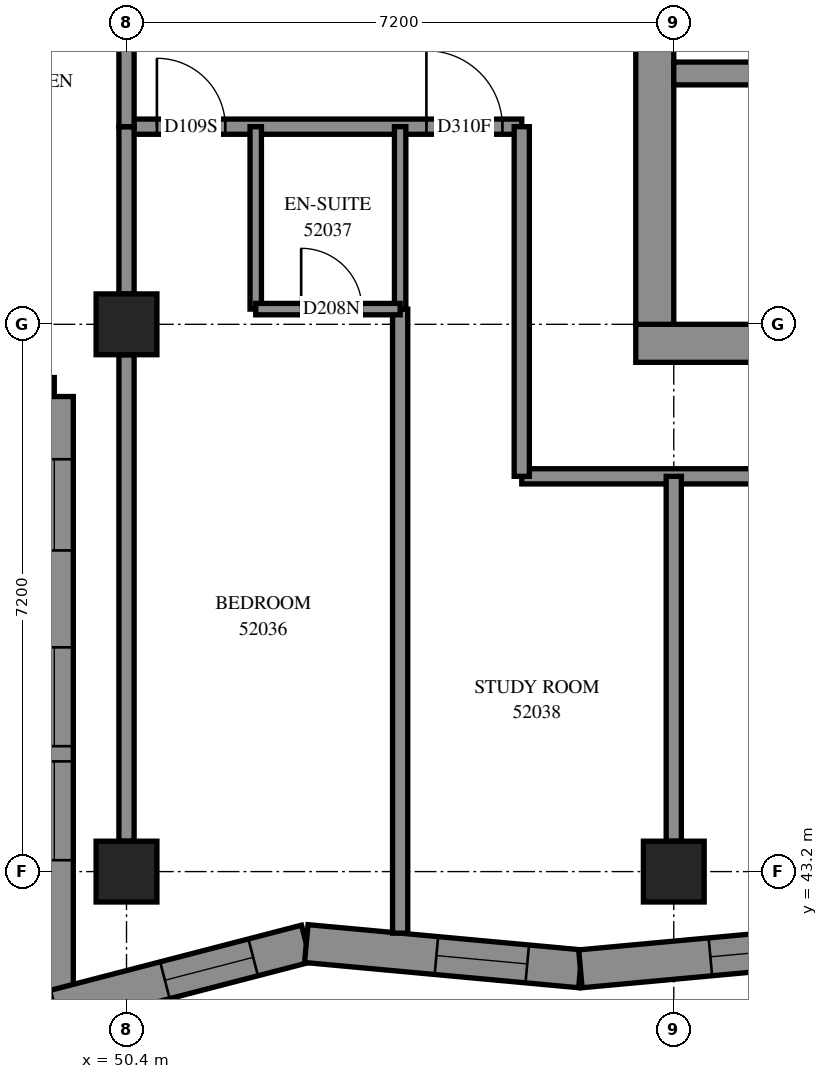
"""IFC4 building model, lengths in metres.
Left out: names, types, materials, properties, quantities, classifications, styles, units other than length and angle.
Written with IfcOpenShell. Run it as: python <this file> out.ifc"""

import sys

from ifc_helpers import new_model, si_unit, direction, frame, frame_2d, origin, origin_2d, place, context, subcontext, project, spatial, polyline, rectangle, outline, extrude, element, fill, save


model = new_model("IFC4")
c1 = context("Model", 3, precision=1e-05, world=origin(), true_north=direction((0.0, 1.0)))
c2 = subcontext(c1, "Body", "Model", "MODEL_VIEW")
j1 = project(units=[si_unit("LENGTHUNIT", "METRE"), si_unit("PLANEANGLEUNIT", "RADIAN")], contexts=[c1])
p1 = place(None, origin())
s1 = spatial("IfcSite", under=j1, at=p1, CompositionType="ELEMENT")
p2 = place(p1, origin())
s2 = spatial("IfcBuilding", under=s1, at=p2, CompositionType="ELEMENT")
p3 = place(p2, frame((0.0, 0.0, 193.0)))
s3 = spatial("IfcBuildingStorey", under=s2, at=p3, CompositionType="ELEMENT", Elevation=193.0)
for number, where, z_axis, x_axis in (
    (1, (50.4, 43.2, 0.0), (0.0, 0.0, 1.0), (1.0, 0.0, 0.0)),
    (2, (50.4, 50.4, 0.0), (0.0, 0.0, 1.0), (1.0, 0.0, 0.0)),
    (3, (57.6, 43.2, 0.0), (0.0, 0.0, 1.0), (1.0, 0.0, 0.0)),
):
    element("IfcColumn", number, at=place(p3, frame(where, z_axis=z_axis, x_axis=x_axis)), inside=s3, PredefinedType="COLUMN", context=c2, shape_type="SweptSolid", body=[
        extrude(rectangle(XDim=0.8, YDim=0.8, at=origin_2d()), origin(), (0.0, 0.0, 1.0), 3.1),
    ])
p4 = place(p3, frame((57.1, 50.15, -0.3), z_axis=(0.0, 0.0, 1.0), x_axis=(1.0, 0.0, 0.0)))
e4 = element("IfcWall", 4, at=p4, inside=s3, PredefinedType="SHEAR", context=c2, shape_type="SweptSolid", body=[
    extrude(rectangle(XDim=15.4, YDim=0.5, at=frame_2d((7.7, 0.0))), origin(), (0.0, 0.0, 1.0), 2.7),
])
p5 = place(p3, frame((57.35, 50.4, -0.3), z_axis=(0.0, 0.0, 1.0), x_axis=(0.0, 1.0, 0.0)))
e5 = element("IfcWall", 5, at=p5, inside=s3, PredefinedType="SHEAR", context=c2, shape_type="SweptSolid", body=[
    extrude(rectangle(XDim=14.4, YDim=0.5, at=frame_2d((7.2, 0.0))), origin(), (0.0, 0.0, 1.0), 2.7),
])
p6 = place(p5, frame((4.55, 0.0, 0.3)))
e6 = element("IfcOpeningElement", 6, at=p6, cuts=e5, PredefinedType="OPENING", context=c2, shape_type="SweptSolid", body=[
    extrude(rectangle(XDim=1.1, YDim=2.1, at=frame_2d((0.55, 1.05))), frame((0.0, 0.26, 0.0), z_axis=(0.0, -1.0, 0.0), x_axis=(1.0, 0.0, 0.0)), (0.0, 0.0, 1.0), 0.52),
])
p7 = place(p5, frame((11.35, 0.0, 0.3)))
e7 = element("IfcOpeningElement", 7, at=p7, cuts=e5, PredefinedType="OPENING", context=c2, shape_type="SweptSolid", body=[
    extrude(rectangle(XDim=1.1, YDim=2.1, at=frame_2d((0.55, 1.05))), frame((0.0, 0.26, 0.0), z_axis=(0.0, -1.0, 0.0), x_axis=(1.0, 0.0, 0.0)), (0.0, 0.0, 1.0), 0.52),
])
p8 = place(p3, frame((57.6, 53.7, 0.0), z_axis=(0.0, 0.0, 1.0), x_axis=(1.0, 0.0, 0.0)))
e8 = element("IfcWall", 8, at=p8, inside=s3, PredefinedType="SOLIDWALL", context=c2, shape_type="SweptSolid", body=[
    extrude(rectangle(XDim=14.4, YDim=0.3, at=frame_2d((7.2, 0.0))), origin(), (0.0, 0.0, 1.0), 3.1),
])
p9 = place(p8, frame((1.35, 0.0, 0.0)))
e9 = element("IfcOpeningElement", 9, at=p9, cuts=e8, PredefinedType="OPENING", context=c2, shape_type="SweptSolid", body=[
    extrude(rectangle(XDim=0.9, YDim=2.1, at=frame_2d((0.45, 1.05))), frame((0.0, 0.16, 0.0), z_axis=(0.0, -1.0, 0.0), x_axis=(1.0, 0.0, 0.0)), (0.0, 0.0, 1.0), 0.32),
])
p10 = place(p8, frame((4.95, 0.0, 0.0)))
e10 = element("IfcOpeningElement", 10, at=p10, cuts=e8, PredefinedType="OPENING", context=c2, shape_type="SweptSolid", body=[
    extrude(rectangle(XDim=0.9, YDim=2.1, at=frame_2d((0.45, 1.05))), frame((0.0, 0.16, 0.0), z_axis=(0.0, -1.0, 0.0), x_axis=(1.0, 0.0, 0.0)), (0.0, 0.0, 1.0), 0.32),
])
p11 = place(p8, frame((8.55, 0.0, 0.0)))
e11 = element("IfcOpeningElement", 11, at=p11, cuts=e8, PredefinedType="OPENING", context=c2, shape_type="SweptSolid", body=[
    extrude(rectangle(XDim=0.9, YDim=2.1, at=frame_2d((0.45, 1.05))), frame((0.0, 0.16, 0.0), z_axis=(0.0, -1.0, 0.0), x_axis=(1.0, 0.0, 0.0)), (0.0, 0.0, 1.0), 0.32),
])
p12 = place(p8, frame((12.05, 0.0, 0.0)))
e12 = element("IfcOpeningElement", 12, at=p12, cuts=e8, PredefinedType="OPENING", context=c2, shape_type="SweptSolid", body=[
    extrude(rectangle(XDim=1.1, YDim=2.1, at=frame_2d((0.55, 1.05))), frame((0.0, 0.16, 0.0), z_axis=(0.0, -1.0, 0.0), x_axis=(1.0, 0.0, 0.0)), (0.0, 0.0, 1.0), 0.32),
])
p13 = place(p3, frame((42.25, 49.45, 0.0), z_axis=(0.0, 0.0, 1.0), x_axis=(1.0, 0.0, 0.0)))
e13 = element("IfcWall", 13, at=p13, inside=s3, PredefinedType="SOLIDWALL", context=c2, shape_type="SweptSolid", body=[
    extrude(outline(polyline([(-0.25, -0.25), (6.95, -0.25), (7.45, 0.25), (0.25, 0.25), (-0.25, -0.25)])), origin(), (0.0, 0.0, 1.0), 3.1),
])
p14 = place(p13, frame((1.35, 0.0, 0.45)))
e14 = element("IfcOpeningElement", 14, at=p14, cuts=e13, PredefinedType="OPENING", context=c2, shape_type="SweptSolid", body=[
    extrude(rectangle(XDim=1.3, YDim=2.5, at=frame_2d((0.65, 1.25))), frame((0.0, 0.26, 0.0), z_axis=(0.0, -1.0, 0.0), x_axis=(1.0, 0.0, 0.0)), (0.0, 0.0, 1.0), 0.52),
])
p15 = place(p13, frame((2.85, 0.0, 0.45)))
e15 = element("IfcOpeningElement", 15, at=p15, cuts=e13, PredefinedType="OPENING", context=c2, shape_type="SweptSolid", body=[
    extrude(rectangle(XDim=1.3, YDim=2.5, at=frame_2d((0.65, 1.25))), frame((0.0, 0.26, 0.0), z_axis=(0.0, -1.0, 0.0), x_axis=(1.0, 0.0, 0.0)), (0.0, 0.0, 1.0), 0.52),
])
p16 = place(p13, frame((5.175, 0.0, 0.45)))
e16 = element("IfcOpeningElement", 16, at=p16, cuts=e13, PredefinedType="OPENING", context=c2, shape_type="SweptSolid", body=[
    extrude(rectangle(XDim=1.2, YDim=2.5, at=frame_2d((0.6, 1.25))), frame((0.0, 0.26, 0.0), z_axis=(0.0, -1.0, 0.0), x_axis=(1.0, 0.0, 0.0)), (0.0, 0.0, 1.0), 0.52),
])
p17 = place(p3, frame((49.45, 49.45, 0.0), z_axis=(0.0, 0.0, 1.0), x_axis=(0.0, -1.0, 0.0)))
e17 = element("IfcWall", 17, at=p17, inside=s3, PredefinedType="SOLIDWALL", context=c2, shape_type="SweptSolid", body=[
    extrude(outline(polyline([(0.25, -0.25), (8.38, -0.25), (7.734, 0.25), (-0.25, 0.25), (0.25, -0.25)])), origin(), (0.0, 0.0, 1.0), 3.1),
])
p18 = place(p17, frame((3.3, 0.0, 0.45)))
e18 = element("IfcOpeningElement", 18, at=p18, cuts=e17, PredefinedType="OPENING", context=c2, shape_type="SweptSolid", body=[
    extrude(rectangle(XDim=1.3, YDim=2.5, at=frame_2d((0.65, 1.25))), frame((0.0, 0.26, 0.0), z_axis=(0.0, -1.0, 0.0), x_axis=(1.0, 0.0, 0.0)), (0.0, 0.0, 1.0), 0.52),
])
p19 = place(p17, frame((4.8, 0.0, 0.45)))
e19 = element("IfcOpeningElement", 19, at=p19, cuts=e17, PredefinedType="OPENING", context=c2, shape_type="SweptSolid", body=[
    extrude(rectangle(XDim=1.3, YDim=2.5, at=frame_2d((0.65, 1.25))), frame((0.0, 0.26, 0.0), z_axis=(0.0, -1.0, 0.0), x_axis=(1.0, 0.0, 0.0)), (0.0, 0.0, 1.0), 0.52),
])
p20 = place(p17, frame((0.825, 0.0, 0.45)))
e20 = element("IfcOpeningElement", 20, at=p20, cuts=e17, PredefinedType="OPENING", context=c2, shape_type="SweptSolid", body=[
    extrude(rectangle(XDim=1.2, YDim=2.5, at=frame_2d((0.6, 1.25))), frame((0.0, 0.26, 0.0), z_axis=(0.0, -1.0, 0.0), x_axis=(1.0, 0.0, 0.0)), (0.0, 0.0, 1.0), 0.52),
])
p21 = place(p3, frame((49.45, 41.393, 0.0), z_axis=(0.0, 0.0, 1.0), x_axis=(0.9679753526, 0.2510452486, 0.0)))
e21 = element("IfcWall", 21, at=p21, inside=s3, PredefinedType="SOLIDWALL", context=c2, shape_type="SweptSolid", body=[
    extrude(outline(polyline([(-0.323, -0.25), (3.381, -0.25), (3.469, 0.25), (0.323, 0.25), (-0.323, -0.25)])), origin(), (0.0, 0.0, 1.0), 3.1),
])
p22 = place(p21, frame((1.503, 0.0, 0.45)))
e22 = element("IfcOpeningElement", 22, at=p22, cuts=e21, PredefinedType="OPENING", context=c2, shape_type="SweptSolid", body=[
    extrude(rectangle(XDim=1.2, YDim=2.5, at=frame_2d((0.6, 1.25))), frame((0.0, 0.26, 0.0), z_axis=(0.0, -1.0, 0.0), x_axis=(1.0, 0.0, 0.0)), (0.0, 0.0, 1.0), 0.52),
])
p23 = place(p3, frame((52.765, 42.253, 0.0), z_axis=(0.0, 0.0, 1.0), x_axis=(0.9957941627, -0.0916186959, 0.0)))
e23 = element("IfcWall", 23, at=p23, inside=s3, PredefinedType="SOLIDWALL", context=c2, shape_type="SweptSolid", body=[
    extrude(outline(polyline([(0.044, -0.25), (3.644, -0.25), (3.599, 0.25), (-0.044, 0.25), (0.044, -0.25)])), origin(), (0.0, 0.0, 1.0), 3.1),
])
p24 = place(p23, frame((1.719, 0.0, 0.45)))
e24 = element("IfcOpeningElement", 24, at=p24, cuts=e23, PredefinedType="OPENING", context=c2, shape_type="SweptSolid", body=[
    extrude(rectangle(XDim=1.2, YDim=2.5, at=frame_2d((0.6, 1.25))), frame((0.0, 0.26, 0.0), z_axis=(0.0, -1.0, 0.0), x_axis=(1.0, 0.0, 0.0)), (0.0, 0.0, 1.0), 0.52),
])
p25 = place(p3, frame((56.371, 41.921, 0.0), z_axis=(0.0, 0.0, 1.0), x_axis=(0.9957917474, 0.0916449443, 0.0)))
e25 = element("IfcWall", 25, at=p25, inside=s3, PredefinedType="SOLIDWALL", context=c2, shape_type="SweptSolid", body=[
    extrude(outline(polyline([(-0.023, -0.25), (3.578, -0.25), (3.624, 0.25), (0.023, 0.25), (-0.023, -0.25)])), origin(), (0.0, 0.0, 1.0), 3.1),
])
p26 = place(p25, frame((1.717, 0.0, 0.45)))
e26 = element("IfcOpeningElement", 26, at=p26, cuts=e25, PredefinedType="OPENING", context=c2, shape_type="SweptSolid", body=[
    extrude(rectangle(XDim=1.2, YDim=2.5, at=frame_2d((0.6, 1.25))), frame((0.0, 0.26, 0.0), z_axis=(0.0, -1.0, 0.0), x_axis=(1.0, 0.0, 0.0)), (0.0, 0.0, 1.0), 0.52),
])
p27 = place(p3, frame((55.6, 48.4, 0.0), z_axis=(0.0, 0.0, 1.0), x_axis=(1.0, 0.0, 0.0)))
e27 = element("IfcWall", 27, at=p27, inside=s3, PredefinedType="PARTITIONING", context=c2, shape_type="SweptSolid", body=[
    extrude(rectangle(XDim=18.4, YDim=0.2, at=frame_2d((9.2, 0.0))), origin(), (0.0, 0.0, 1.0), 3.1),
])
p28 = place(p27, frame((5.862, 0.0, 0.0)))
e28 = element("IfcOpeningElement", 28, at=p28, cuts=e27, PredefinedType="OPENING", context=c2, shape_type="SweptSolid", body=[
    extrude(rectangle(XDim=1.0, YDim=2.1, at=frame_2d((0.5, 1.05))), frame((0.0, 0.11, 0.0), z_axis=(0.0, -1.0, 0.0), x_axis=(1.0, 0.0, 0.0)), (0.0, 0.0, 1.0), 0.22),
])
p29 = place(p27, frame((11.5, 0.0, 0.0)))
e29 = element("IfcOpeningElement", 29, at=p29, cuts=e27, PredefinedType="OPENING", context=c2, shape_type="SweptSolid", body=[
    extrude(rectangle(XDim=0.9, YDim=2.1, at=frame_2d((0.45, 1.05))), frame((0.0, 0.11, 0.0), z_axis=(0.0, -1.0, 0.0), x_axis=(1.0, 0.0, 0.0)), (0.0, 0.0, 1.0), 0.22),
])
p30 = place(p27, frame((13.2, 0.0, 0.0)))
e30 = element("IfcOpeningElement", 30, at=p30, cuts=e27, PredefinedType="OPENING", context=c2, shape_type="SweptSolid", body=[
    extrude(rectangle(XDim=0.9, YDim=2.1, at=frame_2d((0.45, 1.05))), frame((0.0, 0.11, 0.0), z_axis=(0.0, -1.0, 0.0), x_axis=(1.0, 0.0, 0.0)), (0.0, 0.0, 1.0), 0.22),
])
p31 = place(p3, frame((54.0, 42.39, 0.0), z_axis=(0.0, 0.0, 1.0), x_axis=(0.0, 1.0, 0.0)))
e31 = element("IfcWall", 31, at=p31, inside=s3, PredefinedType="PARTITIONING", context=c2, shape_type="SweptSolid", body=[
    extrude(rectangle(XDim=8.21, YDim=0.2, at=frame_2d((4.105, 0.0))), origin(), (0.0, 0.0, 1.0), 3.1),
])
p32 = place(p3, frame((50.4, 43.6, 0.0), z_axis=(0.0, 0.0, 1.0), x_axis=(0.0, 1.0, 0.0)))
e32 = element("IfcWall", 32, at=p32, inside=s3, PredefinedType="PARTITIONING", context=c2, shape_type="SweptSolid", body=[
    extrude(rectangle(XDim=6.4, YDim=0.2, at=frame_2d((3.2, 0.0))), origin(), (0.0, 0.0, 1.0), 2.6),
])
p33 = place(p3, frame((50.4, 53.0, 0.0), z_axis=(0.0, 0.0, 1.0), x_axis=(1.0, 0.0, 0.0)))
e33 = element("IfcWall", 33, at=p33, inside=s3, PredefinedType="PARTITIONING", context=c2, shape_type="SweptSolid", body=[
    extrude(rectangle(XDim=5.2, YDim=0.2, at=frame_2d((2.6, 0.0))), origin(), (0.0, 0.0, 1.0), 3.1),
])
p34 = place(p33, frame((0.4, 0.0, 0.0)))
e34 = element("IfcOpeningElement", 34, at=p34, cuts=e33, PredefinedType="OPENING", context=c2, shape_type="SweptSolid", body=[
    extrude(rectangle(XDim=0.9, YDim=2.1, at=frame_2d((0.45, 1.05))), frame((0.0, 0.11, 0.0), z_axis=(0.0, -1.0, 0.0), x_axis=(1.0, 0.0, 0.0)), (0.0, 0.0, 1.0), 0.22),
])
p35 = place(p33, frame((3.946, 0.0, 0.0)))
e35 = element("IfcOpeningElement", 35, at=p35, cuts=e33, PredefinedType="OPENING", context=c2, shape_type="SweptSolid", body=[
    extrude(rectangle(XDim=1.0, YDim=2.1, at=frame_2d((0.5, 1.05))), frame((0.0, 0.11, 0.0), z_axis=(0.0, -1.0, 0.0), x_axis=(1.0, 0.0, 0.0)), (0.0, 0.0, 1.0), 0.22),
])
p36 = place(p3, frame((57.6, 43.6, 0.0), z_axis=(0.0, 0.0, 1.0), x_axis=(0.0, 1.0, 0.0)))
e36 = element("IfcWall", 36, at=p36, inside=s3, PredefinedType="PARTITIONING", context=c2, shape_type="SweptSolid", body=[
    extrude(rectangle(XDim=4.8, YDim=0.2, at=frame_2d((2.4, 0.0))), origin(), (0.0, 0.0, 1.0), 3.1),
])
p37 = place(p3, frame((55.6, 48.4, 0.0), z_axis=(0.0, 0.0, 1.0), x_axis=(0.0, 1.0, 0.0)))
e37 = element("IfcWall", 37, at=p37, inside=s3, PredefinedType="PARTITIONING", context=c2, shape_type="SweptSolid", body=[
    extrude(rectangle(XDim=4.6, YDim=0.2, at=frame_2d((2.3, 0.0))), origin(), (0.0, 0.0, 1.0), 3.1),
])
for number, where, z_axis, x_axis in (
    (38, (52.1, 50.6, 0.0), (0.0, 0.0, 1.0), (0.0, 1.0, 0.0)),
    (39, (54.0, 50.6, 0.0), (0.0, 0.0, 1.0), (0.0, 1.0, 0.0)),
):
    element("IfcWall", number, at=place(p3, frame(where, z_axis=z_axis, x_axis=x_axis)), inside=s3, PredefinedType="PARTITIONING", context=c2, shape_type="SweptSolid", body=[
        extrude(rectangle(XDim=2.4, YDim=0.15, at=frame_2d((1.2, 0.0))), origin(), (0.0, 0.0, 1.0), 3.1),
    ])
p38 = place(p3, frame((50.4, 50.8, 0.0), z_axis=(0.0, 0.0, 1.0), x_axis=(0.0, 1.0, 0.0)))
e40 = element("IfcWall", 40, at=p38, inside=s3, PredefinedType="PARTITIONING", context=c2, shape_type="SweptSolid", body=[
    extrude(rectangle(XDim=2.2, YDim=0.2, at=frame_2d((1.1, 0.0))), origin(), (0.0, 0.0, 1.0), 3.1),
])
p39 = place(p3, frame((50.4, 53.0, 0.0), z_axis=(0.0, 0.0, 1.0), x_axis=(0.0, 1.0, 0.0)))
e41 = element("IfcWall", 41, at=p39, inside=s3, PredefinedType="PARTITIONING", context=c2, shape_type="SweptSolid", body=[
    extrude(rectangle(XDim=2.0, YDim=0.2, at=frame_2d((1.0, 0.0))), origin(), (0.0, 0.0, 1.0), 3.1),
])
p40 = place(p3, frame((52.1, 50.6, 0.0), z_axis=(0.0, 0.0, 1.0), x_axis=(1.0, 0.0, 0.0)))
e42 = element("IfcWall", 42, at=p40, inside=s3, PredefinedType="PARTITIONING", context=c2, shape_type="SweptSolid", body=[
    extrude(rectangle(XDim=1.9, YDim=0.15, at=frame_2d((0.95, 0.0))), origin(), (0.0, 0.0, 1.0), 3.1),
])
p41 = place(p40, frame((0.598, 0.0, 0.0)))
e43 = element("IfcOpeningElement", 43, at=p41, cuts=e42, PredefinedType="OPENING", context=c2, shape_type="SweptSolid", body=[
    extrude(rectangle(XDim=0.8, YDim=2.1, at=frame_2d((0.4, 1.05))), frame((0.0, 0.085, 0.0), z_axis=(0.0, -1.0, 0.0), x_axis=(1.0, 0.0, 0.0)), (0.0, 0.0, 1.0), 0.17),
])
p42 = place(p18, origin())
e44 = element("IfcWindow", 44, at=p42, inside=s3, PartitioningType="SINGLE_PANEL", PredefinedType="WINDOW", context=c2, shape_type="SweptSolid", body=[
    extrude(rectangle(XDim=1.3, YDim=2.5, at=frame_2d((0.65, 1.25))), frame((0.0, 0.18, 0.0), z_axis=(0.0, -1.0, 0.0), x_axis=(1.0, 0.0, 0.0)), (0.0, 0.0, 1.0), 0.06),
])
fill(e18, e44)
p43 = place(p19, origin())
e45 = element("IfcWindow", 45, at=p43, inside=s3, PartitioningType="SINGLE_PANEL", PredefinedType="WINDOW", context=c2, shape_type="SweptSolid", body=[
    extrude(rectangle(XDim=1.3, YDim=2.5, at=frame_2d((0.65, 1.25))), frame((0.0, 0.18, 0.0), z_axis=(0.0, -1.0, 0.0), x_axis=(1.0, 0.0, 0.0)), (0.0, 0.0, 1.0), 0.06),
])
fill(e19, e45)
p44 = place(p20, origin())
e46 = element("IfcWindow", 46, at=p44, inside=s3, PartitioningType="SINGLE_PANEL", PredefinedType="WINDOW", context=c2, shape_type="SweptSolid", body=[
    extrude(rectangle(XDim=1.2, YDim=2.5, at=frame_2d((0.6, 1.25))), frame((0.0, 0.18, 0.0), z_axis=(0.0, -1.0, 0.0), x_axis=(1.0, 0.0, 0.0)), (0.0, 0.0, 1.0), 0.06),
])
fill(e20, e46)
p45 = place(p22, origin())
e47 = element("IfcWindow", 47, at=p45, inside=s3, PartitioningType="SINGLE_PANEL", PredefinedType="WINDOW", context=c2, shape_type="SweptSolid", body=[
    extrude(rectangle(XDim=1.2, YDim=2.5, at=frame_2d((0.6, 1.25))), frame((0.0, 0.18, 0.0), z_axis=(0.0, -1.0, 0.0), x_axis=(1.0, 0.0, 0.0)), (0.0, 0.0, 1.0), 0.06),
])
fill(e22, e47)
p46 = place(p24, origin())
e48 = element("IfcWindow", 48, at=p46, inside=s3, PartitioningType="SINGLE_PANEL", PredefinedType="WINDOW", context=c2, shape_type="SweptSolid", body=[
    extrude(rectangle(XDim=1.2, YDim=2.5, at=frame_2d((0.6, 1.25))), frame((0.0, 0.18, 0.0), z_axis=(0.0, -1.0, 0.0), x_axis=(1.0, 0.0, 0.0)), (0.0, 0.0, 1.0), 0.06),
])
fill(e24, e48)
p47 = place(p26, origin())
e49 = element("IfcWindow", 49, at=p47, inside=s3, PartitioningType="SINGLE_PANEL", PredefinedType="WINDOW", context=c2, shape_type="SweptSolid", body=[
    extrude(rectangle(XDim=1.2, YDim=2.5, at=frame_2d((0.6, 1.25))), frame((0.0, 0.18, 0.0), z_axis=(0.0, -1.0, 0.0), x_axis=(1.0, 0.0, 0.0)), (0.0, 0.0, 1.0), 0.06),
])
fill(e26, e49)
p48 = place(p34, origin())
e50 = element("IfcDoor", 50, at=p48, inside=s3, OperationType="SINGLE_SWING_LEFT", PredefinedType="DOOR", context=c2, shape_type="SweptSolid", body=[
    extrude(rectangle(XDim=0.9, YDim=2.1, at=frame_2d((0.45, 1.05))), frame((0.0, 0.025, 0.0), z_axis=(0.0, -1.0, 0.0), x_axis=(1.0, 0.0, 0.0)), (0.0, 0.0, 1.0), 0.05),
])
fill(e34, e50)
p49 = place(p41, origin())
e51 = element("IfcDoor", 51, at=p49, inside=s3, OperationType="SINGLE_SWING_RIGHT", PredefinedType="DOOR", context=c2, shape_type="SweptSolid", body=[
    extrude(rectangle(XDim=0.8, YDim=2.1, at=frame_2d((0.4, 1.05))), frame((0.0, 0.025, 0.0), z_axis=(0.0, -1.0, 0.0), x_axis=(1.0, 0.0, 0.0)), (0.0, 0.0, 1.0), 0.05),
])
fill(e43, e51)
p50 = place(p35, origin())
e52 = element("IfcDoor", 52, at=p50, inside=s3, OperationType="SINGLE_SWING_RIGHT", PredefinedType="DOOR", context=c2, shape_type="SweptSolid", body=[
    extrude(rectangle(XDim=1.0, YDim=2.1, at=frame_2d((0.5, 1.05))), frame((0.0, 0.025, 0.0), z_axis=(0.0, -1.0, 0.0), x_axis=(1.0, 0.0, 0.0)), (0.0, 0.0, 1.0), 0.05),
])
fill(e35, e52)
save(model, sys.argv[1])
